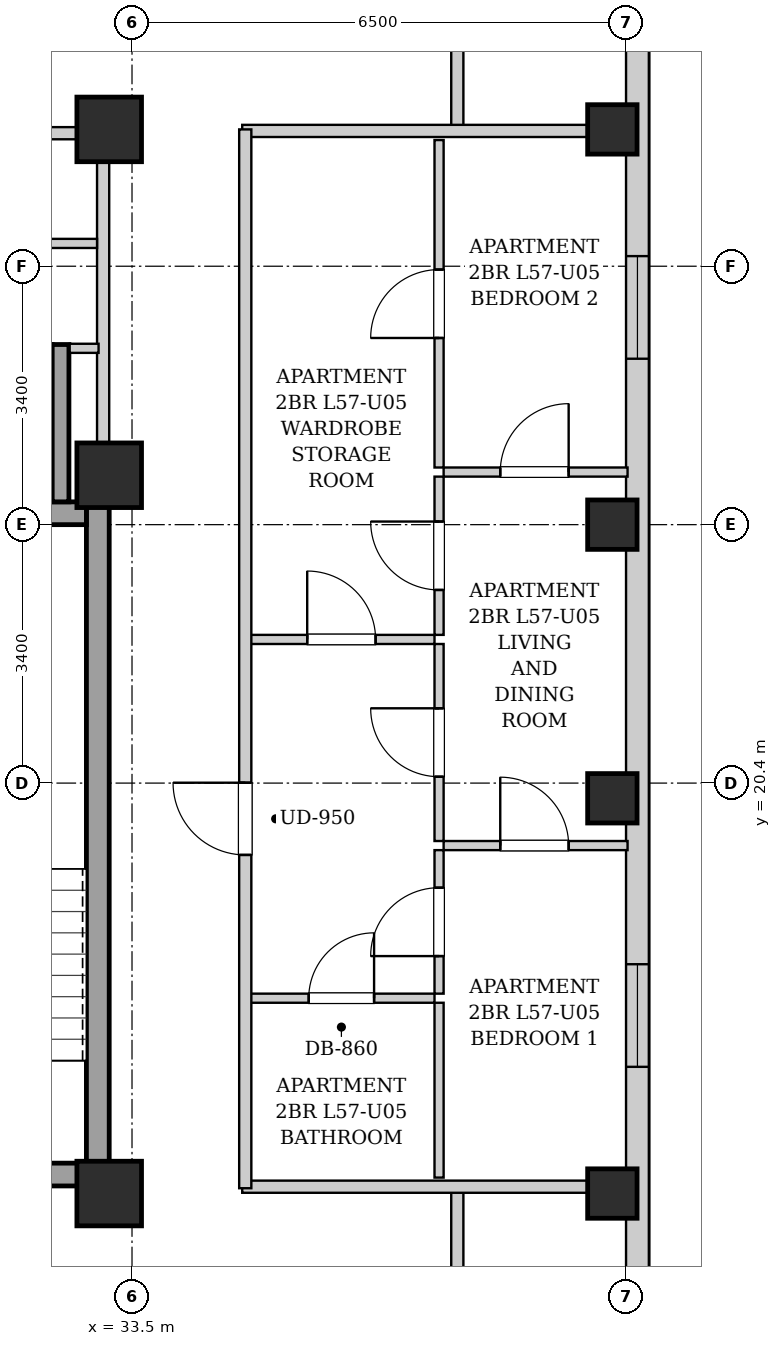
"""IFC4 building model, lengths in metres.
Left out: names, types, materials, properties, quantities, classifications, styles, units other than length and angle.
Written with IfcOpenShell. Run it as: python <this file> out.ifc"""

import sys

from ifc_helpers import new_model, si_unit, direction, frame, frame_2d, origin, origin_2d, place, context, subcontext, project, spatial, rectangle, extrude, element, fill, save


model = new_model("IFC4")
c1 = context("Model", 3, precision=1e-05, world=origin(), true_north=direction((0.0, 1.0)))
c2 = subcontext(c1, "Body", "Model", "MODEL_VIEW")
j1 = project(units=[si_unit("LENGTHUNIT", "METRE"), si_unit("PLANEANGLEUNIT", "RADIAN")], contexts=[c1])
p1 = place(None, origin())
s1 = spatial("IfcSite", under=j1, at=p1, CompositionType="ELEMENT")
p2 = place(p1, origin())
s2 = spatial("IfcBuilding", under=s1, at=p2, CompositionType="ELEMENT")
p3 = place(p2, frame((0.0, 0.0, 197.5)))
s3 = spatial("IfcBuildingStorey", under=s2, at=p3, CompositionType="ELEMENT", Elevation=197.5)
for number, where, z_axis, x_axis in (
    (1, (39.82, 15.0, 0.0), (0.0, 0.0, 1.0), (1.0, 0.0, 0.0)),
    (2, (39.82, 20.2, 0.0), (0.0, 0.0, 1.0), (1.0, 0.0, 0.0)),
    (3, (39.82, 23.8, 0.0), (0.0, 0.0, 1.0), (1.0, 0.0, 0.0)),
    (4, (39.82, 29.0, 0.0), (0.0, 0.0, 1.0), (1.0, 0.0, 0.0)),
):
    element("IfcColumn", number, at=place(p3, frame(where, z_axis=z_axis, x_axis=x_axis)), inside=s3, PredefinedType="COLUMN", context=c2, shape_type="SweptSolid", body=[
        extrude(rectangle(XDim=0.65, YDim=0.65, at=origin_2d()), origin(), (0.0, 0.0, 1.0), 3.3),
    ])
for number, where, z_axis, x_axis in (
    (5, (33.2, 15.0, 0.0), (0.0, 0.0, 1.0), (1.0, 0.0, 0.0)),
    (6, (33.2, 29.0, 0.0), (0.0, 0.0, 1.0), (1.0, 0.0, 0.0)),
    (7, (33.2, 24.45, 0.0), (0.0, 0.0, 1.0), (1.0, 0.0, 0.0)),
):
    element("IfcColumn", number, at=place(p3, frame(where, z_axis=z_axis, x_axis=x_axis)), inside=s3, PredefinedType="COLUMN", context=c2, shape_type="SweptSolid", body=[
        extrude(rectangle(XDim=0.85, YDim=0.85, at=origin_2d()), origin(), (0.0, 0.0, 1.0), 3.3),
    ])
p4 = place(p3, frame((40.15, 37.7, 0.0), z_axis=(0.0, 0.0, 1.0), x_axis=(0.0, -1.0, 0.0)))
e8 = element("IfcWall", 8, at=p4, inside=s3, PredefinedType="SOLIDWALL", context=c2, shape_type="SweptSolid", body=[
    extrude(rectangle(XDim=31.4, YDim=0.3, at=frame_2d((15.7, 0.0))), origin(), (0.0, 0.0, 1.0), 3.04),
])
p5 = place(p4, frame((28.396, 0.0, 0.55)))
e9 = element("IfcOpeningElement", 9, at=p5, cuts=e8, PredefinedType="OPENING", context=c2, shape_type="SweptSolid", body=[
    extrude(rectangle(XDim=1.35, YDim=1.2, at=frame_2d((0.675, 0.6))), frame((0.0, 0.16, 0.0), z_axis=(0.0, -1.0, 0.0), x_axis=(1.0, 0.0, 0.0)), (0.0, 0.0, 1.0), 0.32),
])
p6 = place(p4, frame((1.653, 0.0, 0.55)))
e10 = element("IfcOpeningElement", 10, at=p6, cuts=e8, PredefinedType="OPENING", context=c2, shape_type="SweptSolid", body=[
    extrude(rectangle(XDim=1.35, YDim=1.2, at=frame_2d((0.675, 0.6))), frame((0.0, 0.16, 0.0), z_axis=(0.0, -1.0, 0.0), x_axis=(1.0, 0.0, 0.0)), (0.0, 0.0, 1.0), 0.32),
])
p7 = place(p4, frame((19.683, 0.0, 0.55)))
e11 = element("IfcOpeningElement", 11, at=p7, cuts=e8, PredefinedType="OPENING", context=c2, shape_type="SweptSolid", body=[
    extrude(rectangle(XDim=1.35, YDim=1.2, at=frame_2d((0.675, 0.6))), frame((0.0, 0.16, 0.0), z_axis=(0.0, -1.0, 0.0), x_axis=(1.0, 0.0, 0.0)), (0.0, 0.0, 1.0), 0.32),
])
p8 = place(p4, frame((10.367, 0.0, 0.55)))
e12 = element("IfcOpeningElement", 12, at=p8, cuts=e8, PredefinedType="OPENING", context=c2, shape_type="SweptSolid", body=[
    extrude(rectangle(XDim=1.35, YDim=1.2, at=frame_2d((0.675, 0.6))), frame((0.0, 0.16, 0.0), z_axis=(0.0, -1.0, 0.0), x_axis=(1.0, 0.0, 0.0)), (0.0, 0.0, 1.0), 0.32),
])
p9 = place(p3, frame((33.05, 15.1, 0.0), z_axis=(0.0, 0.0, 1.0), x_axis=(0.0, 1.0, 0.0)))
e13 = element("IfcWall", 13, at=p9, inside=s3, PredefinedType="SHEAR", context=c2, shape_type="SweptSolid", body=[
    extrude(rectangle(XDim=9.0, YDim=0.3, at=frame_2d((4.5, 0.0))), origin(), (0.0, 0.0, 1.0), 3.04),
])
p10 = place(p3, frame((30.05, 23.95, 0.0), z_axis=(0.0, 0.0, 1.0), x_axis=(1.0, 0.0, 0.0)))
e14 = element("IfcWall", 14, at=p10, inside=s3, PredefinedType="SHEAR", context=c2, shape_type="SweptSolid", body=[
    extrude(rectangle(XDim=2.85, YDim=0.3, at=frame_2d((1.425, 0.0))), origin(), (0.0, 0.0, 1.0), 3.04),
])
p11 = place(p3, frame((30.05, 15.25, 0.0), z_axis=(0.0, 0.0, 1.0), x_axis=(1.0, 0.0, 0.0)))
e15 = element("IfcWall", 15, at=p11, inside=s3, PredefinedType="SHEAR", context=c2, shape_type="SweptSolid", body=[
    extrude(rectangle(XDim=2.85, YDim=0.3, at=frame_2d((1.425, 0.0))), origin(), (0.0, 0.0, 1.0), 3.04),
])
p12 = place(p11, frame((0.86, 0.0, 0.0)))
e16 = element("IfcOpeningElement", 16, at=p12, cuts=e15, PredefinedType="OPENING", context=c2, shape_type="SweptSolid", body=[
    extrude(rectangle(XDim=1.1, YDim=2.05, at=frame_2d((0.55, 1.025))), frame((0.0, 0.16, 0.0), z_axis=(0.0, -1.0, 0.0), x_axis=(1.0, 0.0, 0.0)), (0.0, 0.0, 1.0), 0.32),
])
p13 = place(p3, frame((32.56, 24.1, 0.0), z_axis=(0.0, 0.0, 1.0), x_axis=(0.0, 1.0, 0.0)))
e17 = element("IfcWall", 17, at=p13, inside=s3, PredefinedType="SHEAR", context=c2, shape_type="SweptSolid", body=[
    extrude(rectangle(XDim=2.07, YDim=0.22, at=frame_2d((1.035, 0.0))), origin(), (0.0, 0.0, 1.0), 3.04),
])
p14 = place(p3, frame((33.12, 24.12, 0.0), z_axis=(0.0, 0.0, 1.0), x_axis=(0.0, 1.0, 0.0)))
e18 = element("IfcWall", 18, at=p14, inside=s3, PredefinedType="PARTITIONING", context=c2, shape_type="SweptSolid", body=[
    extrude(rectangle(XDim=4.76, YDim=0.16, at=frame_2d((2.38, 0.0))), origin(), (0.0, 0.0, 1.0), 2.375),
])
p15 = place(p3, frame((32.68, 26.12, 0.0), z_axis=(0.0, 0.0, 1.0), x_axis=(1.0, 0.0, 0.0)))
e19 = element("IfcWall", 19, at=p15, inside=s3, PredefinedType="PARTITIONING", context=c2, shape_type="SweptSolid", body=[
    extrude(rectangle(XDim=0.38, YDim=0.12, at=frame_2d((0.19, 0.0))), origin(), (0.0, 0.0, 1.0), 3.04),
])
p16 = place(p3, frame((30.12, 27.5, 0.0), z_axis=(0.0, 0.0, 1.0), x_axis=(1.0, 0.0, 0.0)))
e20 = element("IfcWall", 20, at=p16, inside=s3, PredefinedType="PARTITIONING", context=c2, shape_type="SweptSolid", body=[
    extrude(rectangle(XDim=2.92, YDim=0.12, at=frame_2d((1.46, 0.0))), origin(), (0.0, 0.0, 1.0), 3.04),
])
p17 = place(p16, frame((0.97, 0.0, 0.0)))
e21 = element("IfcOpeningElement", 21, at=p17, cuts=e20, PredefinedType="OPENING", context=c2, shape_type="SweptSolid", body=[
    extrude(rectangle(XDim=0.86, YDim=2.05, at=frame_2d((0.43, 1.025))), frame((0.0, 0.07, 0.0), z_axis=(0.0, -1.0, 0.0), x_axis=(1.0, 0.0, 0.0)), (0.0, 0.0, 1.0), 0.14),
])
p18 = place(p3, frame((25.72, 28.95, 0.0), z_axis=(0.0, 0.0, 1.0), x_axis=(1.0, 0.0, 0.0)))
e22 = element("IfcWall", 22, at=p18, inside=s3, PredefinedType="PARTITIONING", context=c2, shape_type="SweptSolid", body=[
    extrude(rectangle(XDim=7.32, YDim=0.16, at=frame_2d((3.66, 0.0))), origin(), (0.0, 0.0, 1.0), 2.556),
])
p19 = place(p18, frame((1.27, 0.0, 0.0)))
e23 = element("IfcOpeningElement", 23, at=p19, cuts=e22, PredefinedType="OPENING", context=c2, shape_type="SweptSolid", body=[
    extrude(rectangle(XDim=0.86, YDim=2.05, at=frame_2d((0.43, 1.025))), frame((0.0, 0.09, 0.0), z_axis=(0.0, -1.0, 0.0), x_axis=(1.0, 0.0, 0.0)), (0.0, 0.0, 1.0), 0.18),
])
for number, where, z_axis, x_axis in (
    (24, (37.78, 13.51, 0.0), (0.0, 0.0, 1.0), (0.0, 1.0, 0.0)),
    (25, (37.78, 28.98, 0.0), (0.0, 0.0, 1.0), (0.0, 1.0, 0.0)),
):
    element("IfcWall", number, at=place(p3, frame(where, z_axis=z_axis, x_axis=x_axis)), inside=s3, PredefinedType="PARTITIONING", context=c2, shape_type="SweptSolid", body=[
        extrude(rectangle(XDim=1.58, YDim=0.16, at=frame_2d((0.79, 0.0))), origin(), (0.0, 0.0, 1.0), 3.04),
    ])
for number, where, z_axis, x_axis in (
    (26, (34.95, 15.09, 0.0), (0.0, 0.0, 1.0), (1.0, 0.0, 0.0)),
    (27, (34.95, 28.98, 0.0), (0.0, 0.0, 1.0), (1.0, 0.0, 0.0)),
):
    element("IfcWall", number, at=place(p3, frame(where, z_axis=z_axis, x_axis=x_axis)), inside=s3, PredefinedType="PARTITIONING", context=c2, shape_type="SweptSolid", body=[
        extrude(rectangle(XDim=5.07, YDim=0.16, at=frame_2d((2.535, 0.0))), origin(), (0.0, 0.0, 1.0), 2.556),
    ])
p20 = place(p3, frame((35.03, 22.29, 0.0), z_axis=(0.0, 0.0, 1.0), x_axis=(1.0, 0.0, 0.0)))
e28 = element("IfcWall", 28, at=p20, inside=s3, PredefinedType="PARTITIONING", context=c2, shape_type="SweptSolid", body=[
    extrude(rectangle(XDim=2.45, YDim=0.12, at=frame_2d((1.225, 0.0))), origin(), (0.0, 0.0, 1.0), 3.04),
])
p21 = place(p20, frame((0.775, 0.0, 0.0)))
e29 = element("IfcOpeningElement", 29, at=p21, cuts=e28, PredefinedType="OPENING", context=c2, shape_type="SweptSolid", body=[
    extrude(rectangle(XDim=0.9, YDim=2.05, at=frame_2d((0.45, 1.025))), frame((0.0, 0.07, 0.0), z_axis=(0.0, -1.0, 0.0), x_axis=(1.0, 0.0, 0.0)), (0.0, 0.0, 1.0), 0.14),
])
p22 = place(p3, frame((37.54, 22.35, 0.0), z_axis=(0.0, 0.0, 1.0), x_axis=(0.0, 1.0, 0.0)))
e30 = element("IfcWall", 30, at=p22, inside=s3, PredefinedType="PARTITIONING", context=c2, shape_type="SweptSolid", body=[
    extrude(rectangle(XDim=2.082, YDim=0.12, at=frame_2d((1.041, 0.0))), origin(), (0.0, 0.0, 1.0), 3.04),
])
p23 = place(p22, frame((0.591, 0.0, 0.0)))
e31 = element("IfcOpeningElement", 31, at=p23, cuts=e30, PredefinedType="OPENING", context=c2, shape_type="SweptSolid", body=[
    extrude(rectangle(XDim=0.9, YDim=2.05, at=frame_2d((0.45, 1.025))), frame((0.0, 0.07, 0.0), z_axis=(0.0, -1.0, 0.0), x_axis=(1.0, 0.0, 0.0)), (0.0, 0.0, 1.0), 0.14),
])
p24 = place(p3, frame((37.54, 24.552, 0.0), z_axis=(0.0, 0.0, 1.0), x_axis=(0.0, 1.0, 0.0)))
e32 = element("IfcWall", 32, at=p24, inside=s3, PredefinedType="PARTITIONING", context=c2, shape_type="SweptSolid", body=[
    extrude(rectangle(XDim=4.308, YDim=0.12, at=frame_2d((2.154, 0.0))), origin(), (0.0, 0.0, 1.0), 3.04),
])
p25 = place(p24, frame((1.704, 0.0, 0.0)))
e33 = element("IfcOpeningElement", 33, at=p25, cuts=e32, PredefinedType="OPENING", context=c2, shape_type="SweptSolid", body=[
    extrude(rectangle(XDim=0.9, YDim=2.05, at=frame_2d((0.45, 1.025))), frame((0.0, 0.07, 0.0), z_axis=(0.0, -1.0, 0.0), x_axis=(1.0, 0.0, 0.0)), (0.0, 0.0, 1.0), 0.14),
])
p26 = place(p3, frame((35.03, 17.57, 0.0), z_axis=(0.0, 0.0, 1.0), x_axis=(1.0, 0.0, 0.0)))
e34 = element("IfcWall", 34, at=p26, inside=s3, PredefinedType="PARTITIONING", context=c2, shape_type="SweptSolid", body=[
    extrude(rectangle(XDim=2.45, YDim=0.12, at=frame_2d((1.225, 0.0))), origin(), (0.0, 0.0, 1.0), 3.04),
])
p27 = place(p26, frame((0.795, 0.0, 0.0)))
e35 = element("IfcOpeningElement", 35, at=p27, cuts=e34, PredefinedType="OPENING", context=c2, shape_type="SweptSolid", body=[
    extrude(rectangle(XDim=0.86, YDim=2.05, at=frame_2d((0.43, 1.025))), frame((0.0, 0.07, 0.0), z_axis=(0.0, -1.0, 0.0), x_axis=(1.0, 0.0, 0.0)), (0.0, 0.0, 1.0), 0.14),
])
p28 = place(p3, frame((37.54, 15.21, 0.0), z_axis=(0.0, 0.0, 1.0), x_axis=(0.0, 1.0, 0.0)))
e36 = element("IfcWall", 36, at=p28, inside=s3, PredefinedType="PARTITIONING", context=c2, shape_type="SweptSolid", body=[
    extrude(rectangle(XDim=2.3, YDim=0.12, at=frame_2d((1.15, 0.0))), origin(), (0.0, 0.0, 1.0), 3.04),
])
p29 = place(p3, frame((37.54, 17.63, 0.0), z_axis=(0.0, 0.0, 1.0), x_axis=(0.0, 1.0, 0.0)))
e37 = element("IfcWall", 37, at=p29, inside=s3, PredefinedType="PARTITIONING", context=c2, shape_type="SweptSolid", body=[
    extrude(rectangle(XDim=1.888, YDim=0.12, at=frame_2d((0.944, 0.0))), origin(), (0.0, 0.0, 1.0), 3.04),
])
p30 = place(p29, frame((0.494, 0.0, 0.0)))
e38 = element("IfcOpeningElement", 38, at=p30, cuts=e37, PredefinedType="OPENING", context=c2, shape_type="SweptSolid", body=[
    extrude(rectangle(XDim=0.9, YDim=2.05, at=frame_2d((0.45, 1.025))), frame((0.0, 0.07, 0.0), z_axis=(0.0, -1.0, 0.0), x_axis=(1.0, 0.0, 0.0)), (0.0, 0.0, 1.0), 0.14),
])
p31 = place(p3, frame((37.54, 19.638, 0.0), z_axis=(0.0, 0.0, 1.0), x_axis=(0.0, 1.0, 0.0)))
e39 = element("IfcWall", 39, at=p31, inside=s3, PredefinedType="PARTITIONING", context=c2, shape_type="SweptSolid", body=[
    extrude(rectangle(XDim=2.592, YDim=0.12, at=frame_2d((1.296, 0.0))), origin(), (0.0, 0.0, 1.0), 3.04),
])
p32 = place(p31, frame((0.846, 0.0, 0.0)))
e40 = element("IfcOpeningElement", 40, at=p32, cuts=e39, PredefinedType="OPENING", context=c2, shape_type="SweptSolid", body=[
    extrude(rectangle(XDim=0.9, YDim=2.05, at=frame_2d((0.45, 1.025))), frame((0.0, 0.07, 0.0), z_axis=(0.0, -1.0, 0.0), x_axis=(1.0, 0.0, 0.0)), (0.0, 0.0, 1.0), 0.14),
])
p33 = place(p3, frame((37.6, 19.578, 0.0), z_axis=(0.0, 0.0, 1.0), x_axis=(1.0, 0.0, 0.0)))
e41 = element("IfcWall", 41, at=p33, inside=s3, PredefinedType="PARTITIONING", context=c2, shape_type="SweptSolid", body=[
    extrude(rectangle(XDim=2.42, YDim=0.12, at=frame_2d((1.21, 0.0))), origin(), (0.0, 0.0, 1.0), 3.04),
])
p34 = place(p33, frame((0.745, 0.0, 0.0)))
e42 = element("IfcOpeningElement", 42, at=p34, cuts=e41, PredefinedType="OPENING", context=c2, shape_type="SweptSolid", body=[
    extrude(rectangle(XDim=0.9, YDim=2.05, at=frame_2d((0.45, 1.025))), frame((0.0, 0.07, 0.0), z_axis=(0.0, -1.0, 0.0), x_axis=(1.0, 0.0, 0.0)), (0.0, 0.0, 1.0), 0.14),
])
p35 = place(p3, frame((37.6, 24.492, 0.0), z_axis=(0.0, 0.0, 1.0), x_axis=(1.0, 0.0, 0.0)))
e43 = element("IfcWall", 43, at=p35, inside=s3, PredefinedType="PARTITIONING", context=c2, shape_type="SweptSolid", body=[
    extrude(rectangle(XDim=2.42, YDim=0.12, at=frame_2d((1.21, 0.0))), origin(), (0.0, 0.0, 1.0), 2.722),
])
p36 = place(p35, frame((0.745, 0.0, 0.0)))
e44 = element("IfcOpeningElement", 44, at=p36, cuts=e43, PredefinedType="OPENING", context=c2, shape_type="SweptSolid", body=[
    extrude(rectangle(XDim=0.9, YDim=2.05, at=frame_2d((0.45, 1.025))), frame((0.0, 0.07, 0.0), z_axis=(0.0, -1.0, 0.0), x_axis=(1.0, 0.0, 0.0)), (0.0, 0.0, 1.0), 0.14),
])
p37 = place(p3, frame((34.99, 15.07, 0.0), z_axis=(0.0, 0.0, 1.0), x_axis=(0.0, 1.0, 0.0)))
e45 = element("IfcWall", 45, at=p37, inside=s3, PredefinedType="PARTITIONING", context=c2, shape_type="SweptSolid", body=[
    extrude(rectangle(XDim=13.93, YDim=0.16, at=frame_2d((6.965, 0.0))), origin(), (0.0, 0.0, 1.0), 3.04),
])
p38 = place(p37, frame((4.385, 0.0, 0.0)))
e46 = element("IfcOpeningElement", 46, at=p38, cuts=e45, PredefinedType="OPENING", context=c2, shape_type="SweptSolid", body=[
    extrude(rectangle(XDim=0.95, YDim=2.1, at=frame_2d((0.475, 1.05))), frame((0.0, 0.09, 0.0), z_axis=(0.0, -1.0, 0.0), x_axis=(1.0, 0.0, 0.0)), (0.0, 0.0, 1.0), 0.18),
])
p39 = place(p21, origin())
e47 = element("IfcDoor", 47, at=p39, inside=s3, OperationType="SINGLE_SWING_LEFT", PredefinedType="DOOR", context=c2, shape_type="SweptSolid", body=[
    extrude(rectangle(XDim=0.9, YDim=2.05, at=frame_2d((0.45, 1.025))), frame((0.0, 0.025, 0.0), z_axis=(0.0, -1.0, 0.0), x_axis=(1.0, 0.0, 0.0)), (0.0, 0.0, 1.0), 0.05),
])
fill(e29, e47)
p40 = place(p23, origin())
e48 = element("IfcDoor", 48, at=p40, inside=s3, OperationType="SINGLE_SWING_RIGHT", PredefinedType="DOOR", context=c2, shape_type="SweptSolid", body=[
    extrude(rectangle(XDim=0.9, YDim=2.05, at=frame_2d((0.45, 1.025))), frame((0.0, 0.025, 0.0), z_axis=(0.0, -1.0, 0.0), x_axis=(1.0, 0.0, 0.0)), (0.0, 0.0, 1.0), 0.05),
])
fill(e31, e48)
p41 = place(p25, origin())
e49 = element("IfcDoor", 49, at=p41, inside=s3, OperationType="SINGLE_SWING_LEFT", PredefinedType="DOOR", context=c2, shape_type="SweptSolid", body=[
    extrude(rectangle(XDim=0.9, YDim=2.05, at=frame_2d((0.45, 1.025))), frame((0.0, 0.025, 0.0), z_axis=(0.0, -1.0, 0.0), x_axis=(1.0, 0.0, 0.0)), (0.0, 0.0, 1.0), 0.05),
])
fill(e33, e49)
p42 = place(p27, origin())
e50 = element("IfcDoor", 50, at=p42, inside=s3, OperationType="SINGLE_SWING_RIGHT", PredefinedType="DOOR", context=c2, shape_type="SweptSolid", body=[
    extrude(rectangle(XDim=0.86, YDim=2.05, at=frame_2d((0.43, 1.025))), frame((0.0, 0.025, 0.0), z_axis=(0.0, -1.0, 0.0), x_axis=(1.0, 0.0, 0.0)), (0.0, 0.0, 1.0), 0.05),
])
fill(e35, e50)
p43 = place(p30, origin())
e51 = element("IfcDoor", 51, at=p43, inside=s3, OperationType="SINGLE_SWING_LEFT", PredefinedType="DOOR", context=c2, shape_type="SweptSolid", body=[
    extrude(rectangle(XDim=0.9, YDim=2.05, at=frame_2d((0.45, 1.025))), frame((0.0, 0.025, 0.0), z_axis=(0.0, -1.0, 0.0), x_axis=(1.0, 0.0, 0.0)), (0.0, 0.0, 1.0), 0.05),
])
fill(e38, e51)
p44 = place(p32, origin())
e52 = element("IfcDoor", 52, at=p44, inside=s3, OperationType="SINGLE_SWING_RIGHT", PredefinedType="DOOR", context=c2, shape_type="SweptSolid", body=[
    extrude(rectangle(XDim=0.9, YDim=2.05, at=frame_2d((0.45, 1.025))), frame((0.0, 0.025, 0.0), z_axis=(0.0, -1.0, 0.0), x_axis=(1.0, 0.0, 0.0)), (0.0, 0.0, 1.0), 0.05),
])
fill(e40, e52)
p45 = place(p34, origin())
e53 = element("IfcDoor", 53, at=p45, inside=s3, OperationType="SINGLE_SWING_LEFT", PredefinedType="DOOR", context=c2, shape_type="SweptSolid", body=[
    extrude(rectangle(XDim=0.9, YDim=2.05, at=frame_2d((0.45, 1.025))), frame((0.0, 0.025, 0.0), z_axis=(0.0, -1.0, 0.0), x_axis=(1.0, 0.0, 0.0)), (0.0, 0.0, 1.0), 0.05),
])
fill(e42, e53)
p46 = place(p36, origin())
e54 = element("IfcDoor", 54, at=p46, inside=s3, OperationType="SINGLE_SWING_RIGHT", PredefinedType="DOOR", context=c2, shape_type="SweptSolid", body=[
    extrude(rectangle(XDim=0.9, YDim=2.05, at=frame_2d((0.45, 1.025))), frame((0.0, 0.025, 0.0), z_axis=(0.0, -1.0, 0.0), x_axis=(1.0, 0.0, 0.0)), (0.0, 0.0, 1.0), 0.05),
])
fill(e44, e54)
p47 = place(p38, origin())
e55 = element("IfcDoor", 55, at=p47, inside=s3, OperationType="SINGLE_SWING_RIGHT", PredefinedType="DOOR", context=c2, shape_type="SweptSolid", body=[
    extrude(rectangle(XDim=0.95, YDim=2.1, at=frame_2d((0.475, 1.05))), frame((0.0, 0.025, 0.0), z_axis=(0.0, -1.0, 0.0), x_axis=(1.0, 0.0, 0.0)), (0.0, 0.0, 1.0), 0.05),
])
fill(e46, e55)
p48 = place(p7, origin())
e56 = element("IfcWindow", 56, at=p48, inside=s3, PartitioningType="SINGLE_PANEL", PredefinedType="WINDOW", context=c2, shape_type="SweptSolid", body=[
    extrude(rectangle(XDim=1.35, YDim=1.2, at=frame_2d((0.675, 0.6))), frame((0.0, 0.03, 0.0), z_axis=(0.0, -1.0, 0.0), x_axis=(1.0, 0.0, 0.0)), (0.0, 0.0, 1.0), 0.06),
])
fill(e11, e56)
p49 = place(p8, origin())
e57 = element("IfcWindow", 57, at=p49, inside=s3, PartitioningType="SINGLE_PANEL", PredefinedType="WINDOW", context=c2, shape_type="SweptSolid", body=[
    extrude(rectangle(XDim=1.35, YDim=1.2, at=frame_2d((0.675, 0.6))), frame((0.0, 0.03, 0.0), z_axis=(0.0, -1.0, 0.0), x_axis=(1.0, 0.0, 0.0)), (0.0, 0.0, 1.0), 0.06),
])
fill(e12, e57)
save(model, sys.argv[1])
